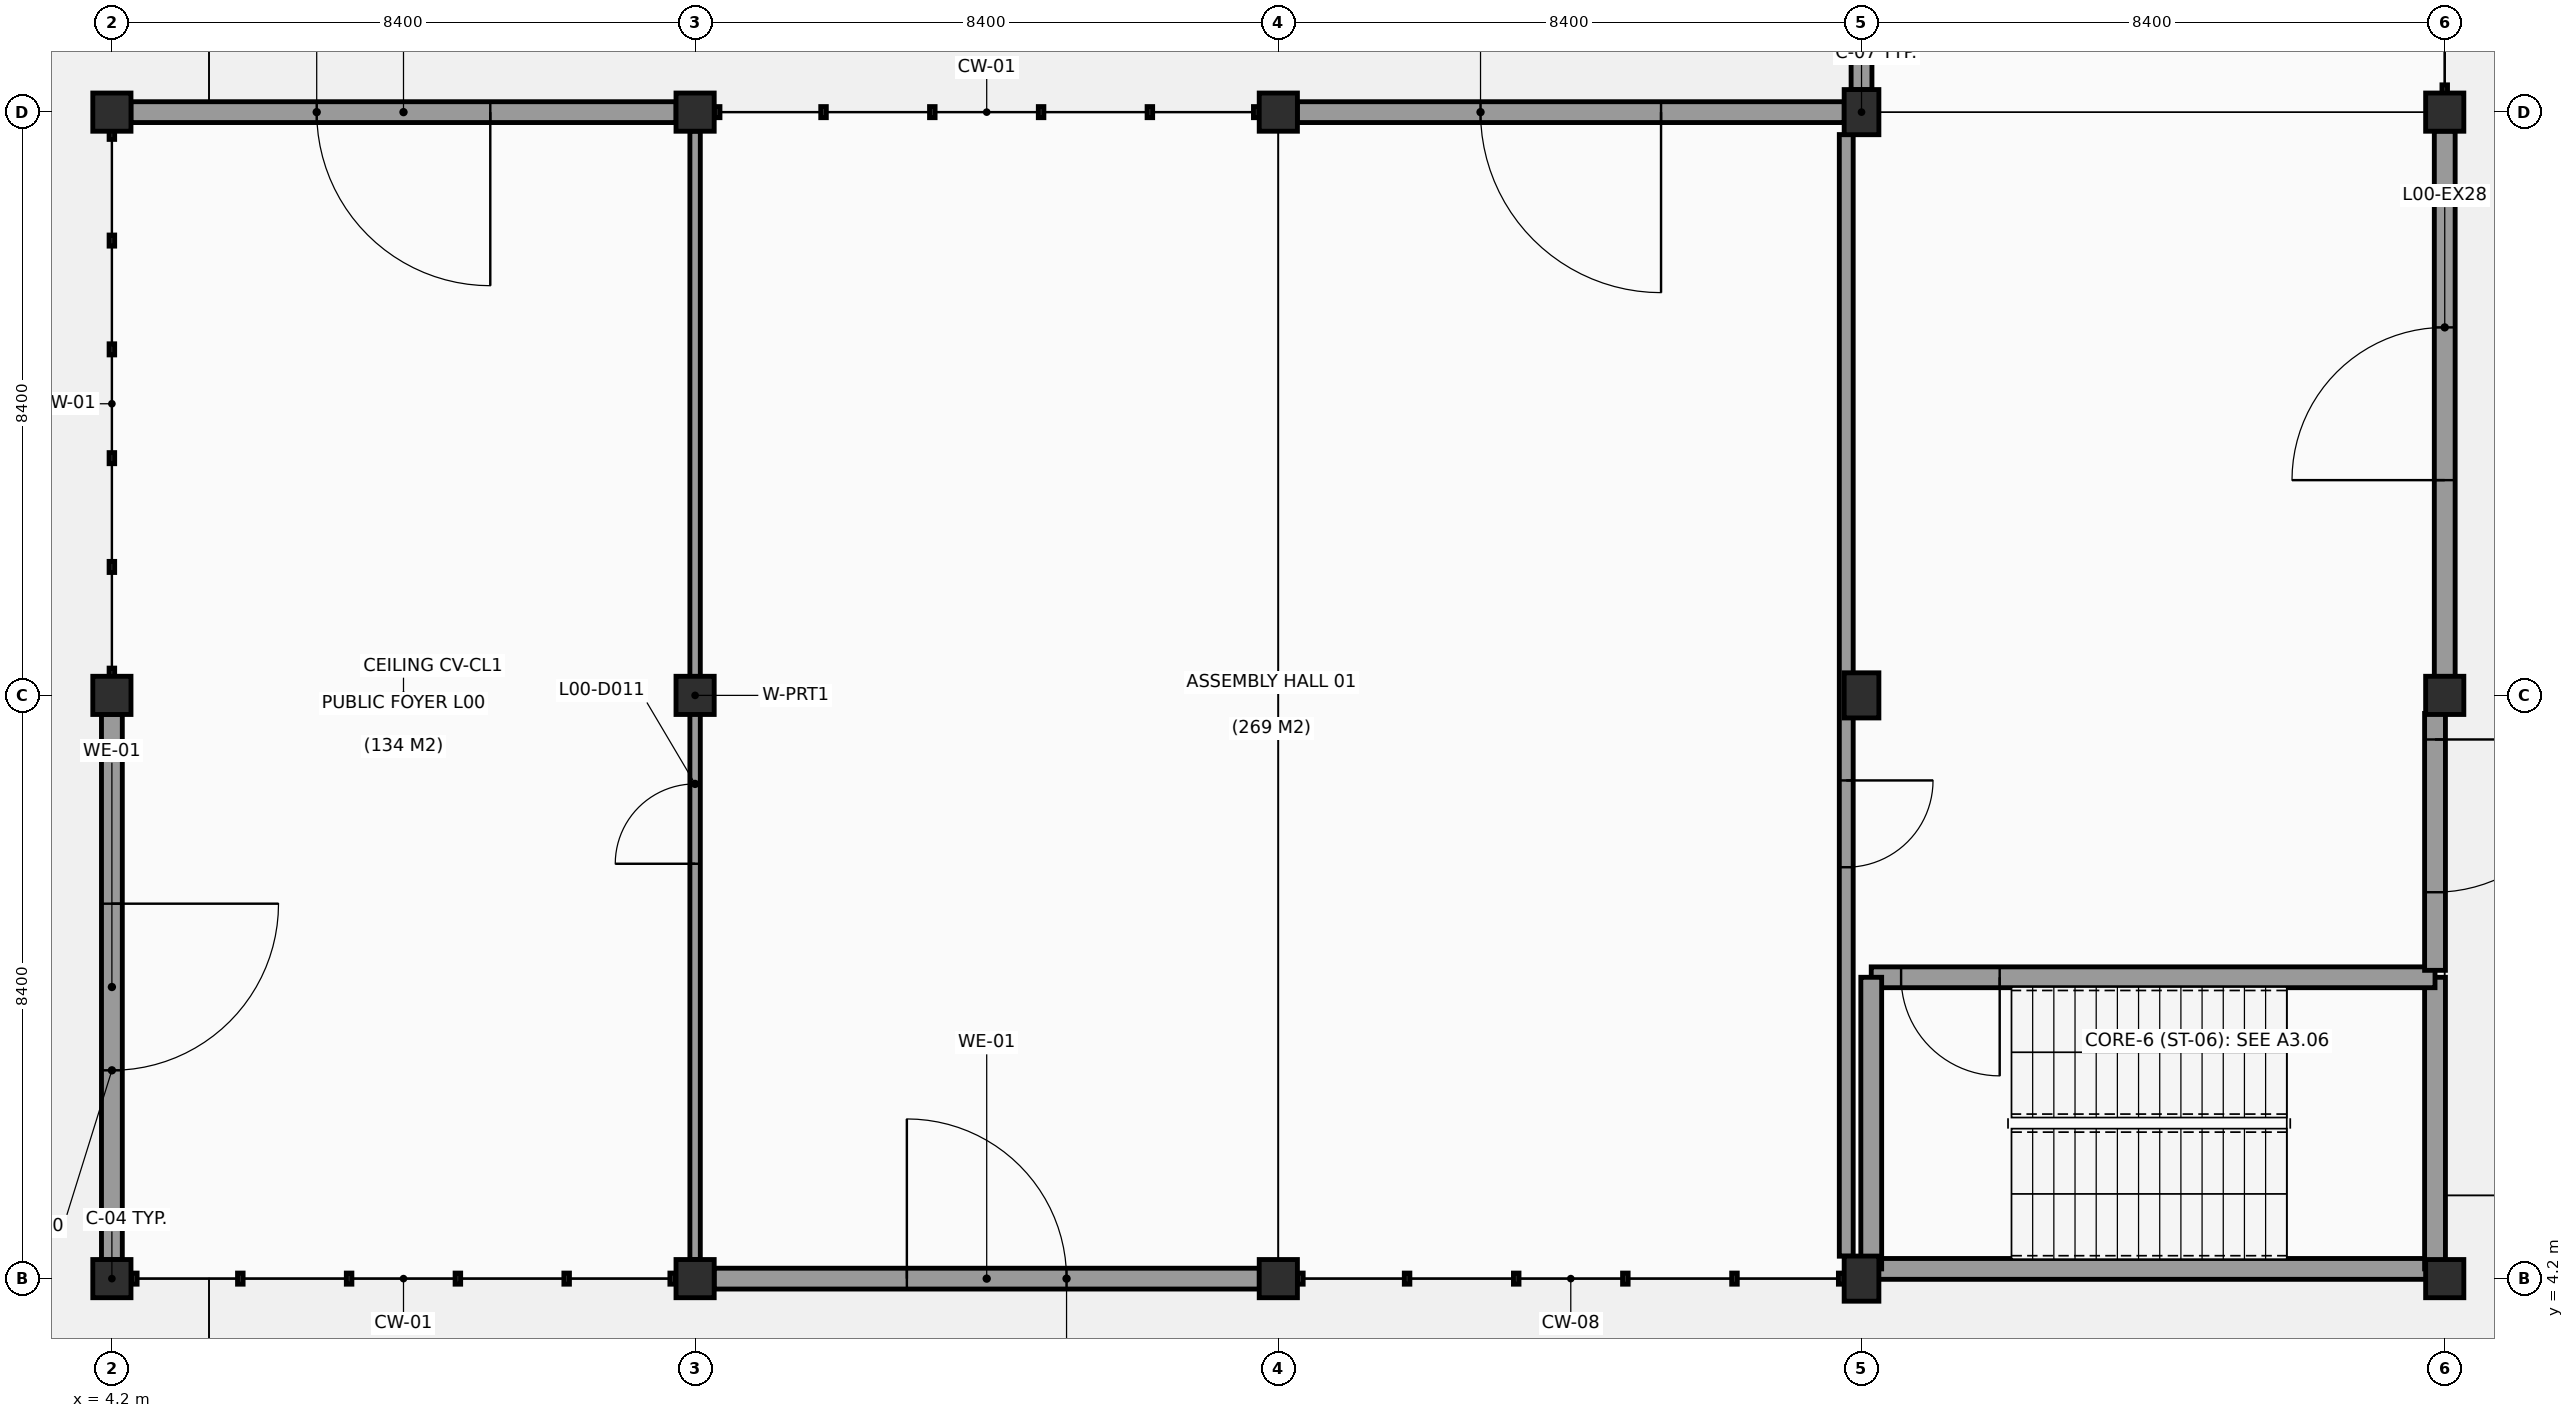
"""IFC4 building model, lengths in metres.
Left out: names, types, materials, properties, quantities, classifications, styles, units other than length and angle.
Written with IfcOpenShell. Run it as: python <this file> out.ifc"""

import sys

from ifc_helpers import new_model, si_unit, direction, frame, frame_2d, origin, origin_2d, place, context, subcontext, project, spatial, rectangle, extrude, element, fill, save


model = new_model("IFC4")
c1 = context("Model", 3, precision=1e-05, world=origin(), true_north=direction((0.0, 1.0)))
c2 = subcontext(c1, "Body", "Model", "MODEL_VIEW")
j1 = project(units=[si_unit("LENGTHUNIT", "METRE"), si_unit("PLANEANGLEUNIT", "RADIAN")], contexts=[c1])
p1 = place(None, origin())
s1 = spatial("IfcSite", under=j1, at=p1, CompositionType="ELEMENT")
p2 = place(p1, origin())
s2 = spatial("IfcBuilding", under=s1, at=p2, CompositionType="ELEMENT")
p3 = place(p2, origin())
s3 = spatial("IfcBuildingStorey", under=s2, at=p3, CompositionType="ELEMENT", Elevation=0.0)
for number, where, z_axis, x_axis in (
    (1, (4.2, 4.2, -0.4), (0.0, 0.0, 1.0), (1.0, 0.0, 0.0)),
    (2, (4.2, 12.6, -0.4), (0.0, 0.0, 1.0), (1.0, 0.0, 0.0)),
    (3, (4.2, 21.0, -0.4), (0.0, 0.0, 1.0), (1.0, 0.0, 0.0)),
    (4, (12.6, 4.2, -0.4), (0.0, 0.0, 1.0), (1.0, 0.0, 0.0)),
    (5, (12.6, 12.6, -0.4), (0.0, 0.0, 1.0), (1.0, 0.0, 0.0)),
    (6, (12.6, 21.0, -0.4), (0.0, 0.0, 1.0), (1.0, 0.0, 0.0)),
    (7, (21.0, 4.2, -0.4), (0.0, 0.0, 1.0), (1.0, 0.0, 0.0)),
    (8, (21.0, 21.0, -0.4), (0.0, 0.0, 1.0), (1.0, 0.0, 0.0)),
):
    element("IfcColumn", number, at=place(p3, frame(where, z_axis=z_axis, x_axis=x_axis)), inside=s3, PredefinedType="COLUMN", context=c2, shape_type="SweptSolid", body=[
        extrude(rectangle(XDim=0.55, YDim=0.55, at=origin_2d()), origin(), (0.0, 0.0, 1.0), 4.6),
    ])
for number, where, z_axis, x_axis in (
    (9, (29.4, 4.2, -0.4), (0.0, 0.0, 1.0), (1.0, 0.0, 0.0)),
    (10, (29.4, 12.6, -0.4), (0.0, 0.0, 1.0), (1.0, 0.0, 0.0)),
    (11, (29.4, 21.0, -0.4), (0.0, 0.0, 1.0), (1.0, 0.0, 0.0)),
):
    element("IfcColumn", number, at=place(p3, frame(where, z_axis=z_axis, x_axis=x_axis)), inside=s3, PredefinedType="COLUMN", context=c2, shape_type="SweptSolid", body=[
        extrude(rectangle(XDim=0.5, YDim=0.65, at=origin_2d()), origin(), (0.0, 0.0, 1.0), 4.6),
    ])
for number, where, z_axis, x_axis in (
    (12, (37.8, 4.2, -0.4), (0.0, 0.0, 1.0), (1.0, 0.0, 0.0)),
    (13, (37.8, 12.6, -0.4), (0.0, 0.0, 1.0), (1.0, 0.0, 0.0)),
    (14, (37.8, 21.0, -0.4), (0.0, 0.0, 1.0), (1.0, 0.0, 0.0)),
):
    element("IfcColumn", number, at=place(p3, frame(where, z_axis=z_axis, x_axis=x_axis)), inside=s3, PredefinedType="COLUMN", context=c2, shape_type="SweptSolid", body=[
        extrude(rectangle(XDim=0.55, YDim=0.55, at=origin_2d()), origin(), (0.0, 0.0, 1.0), 4.6),
    ])
p4 = place(p3, frame((29.4, 21.323, 0.0), z_axis=(0.0, 0.0, 1.0), x_axis=(0.0, 1.0, 0.0)))
e15 = element("IfcWall", 15, at=p4, inside=s3, PredefinedType="SOLIDWALL", context=c2, shape_type="SweptSolid", body=[
    extrude(rectangle(XDim=7.754, YDim=0.3, at=frame_2d((3.877, 0.0))), origin(), (0.0, 0.0, 1.0), 3.22),
])
p5 = place(p4, frame((2.827, 0.0, 0.0)))
e16 = element("IfcOpeningElement", 16, at=p5, cuts=e15, PredefinedType="OPENING", context=c2, shape_type="SweptSolid", body=[
    extrude(rectangle(XDim=2.1, YDim=2.3, at=frame_2d((1.05, 1.15))), frame((0.0, 0.16, 0.0), z_axis=(0.0, -1.0, 0.0), x_axis=(1.0, 0.0, 0.0)), (0.0, 0.0, 1.0), 0.32),
])
p6 = place(p3, frame((37.8, 20.727, 0.0), z_axis=(0.0, 0.0, 1.0), x_axis=(0.0, -1.0, 0.0)))
e17 = element("IfcWall", 17, at=p6, inside=s3, PredefinedType="SOLIDWALL", context=c2, shape_type="SweptSolid", body=[
    extrude(rectangle(XDim=7.854, YDim=0.3, at=frame_2d((3.927, 0.0))), origin(), (0.0, 0.0, 1.0), 3.22),
])
p7 = place(p6, frame((2.827, 0.0, 0.0)))
e18 = element("IfcOpeningElement", 18, at=p7, cuts=e17, PredefinedType="OPENING", context=c2, shape_type="SweptSolid", body=[
    extrude(rectangle(XDim=2.2, YDim=2.35, at=frame_2d((1.1, 1.175))), frame((0.0, 0.16, 0.0), z_axis=(0.0, -1.0, 0.0), x_axis=(1.0, 0.0, 0.0)), (0.0, 0.0, 1.0), 0.32),
])
p8 = place(p3, frame((20.727, 4.2, 0.0), z_axis=(0.0, 0.0, 1.0), x_axis=(-1.0, 0.0, 0.0)))
e19 = element("IfcWall", 19, at=p8, inside=s3, PredefinedType="SOLIDWALL", context=c2, shape_type="SweptSolid", body=[
    extrude(rectangle(XDim=7.854, YDim=0.3, at=frame_2d((3.927, 0.0))), origin(), (0.0, 0.0, 1.0), 3.22),
])
p9 = place(p8, frame((2.777, 0.0, 0.0)))
e20 = element("IfcOpeningElement", 20, at=p9, cuts=e19, PredefinedType="OPENING", context=c2, shape_type="SweptSolid", body=[
    extrude(rectangle(XDim=2.3, YDim=2.4, at=frame_2d((1.15, 1.2))), frame((0.0, 0.16, 0.0), z_axis=(0.0, -1.0, 0.0), x_axis=(1.0, 0.0, 0.0)), (0.0, 0.0, 1.0), 0.32),
])
p10 = place(p3, frame((4.2, 4.473, 0.0), z_axis=(0.0, 0.0, 1.0), x_axis=(0.0, 1.0, 0.0)))
e21 = element("IfcWall", 21, at=p10, inside=s3, PredefinedType="SOLIDWALL", context=c2, shape_type="SweptSolid", body=[
    extrude(rectangle(XDim=7.854, YDim=0.3, at=frame_2d((3.927, 0.0))), origin(), (0.0, 0.0, 1.0), 3.22),
])
p11 = place(p10, frame((2.727, 0.0, 0.0)))
e22 = element("IfcOpeningElement", 22, at=p11, cuts=e21, PredefinedType="OPENING", context=c2, shape_type="SweptSolid", body=[
    extrude(rectangle(XDim=2.4, YDim=2.45, at=frame_2d((1.2, 1.225))), frame((0.0, 0.16, 0.0), z_axis=(0.0, -1.0, 0.0), x_axis=(1.0, 0.0, 0.0)), (0.0, 0.0, 1.0), 0.32),
])
p12 = place(p3, frame((4.473, 21.0, 0.0), z_axis=(0.0, 0.0, 1.0), x_axis=(1.0, 0.0, 0.0)))
e23 = element("IfcWall", 23, at=p12, inside=s3, PredefinedType="SOLIDWALL", context=c2, shape_type="SweptSolid", body=[
    extrude(rectangle(XDim=7.854, YDim=0.3, at=frame_2d((3.927, 0.0))), origin(), (0.0, 0.0, 1.0), 3.22),
])
p13 = place(p12, frame((2.677, 0.0, 0.0)))
e24 = element("IfcOpeningElement", 24, at=p13, cuts=e23, PredefinedType="OPENING", context=c2, shape_type="SweptSolid", body=[
    extrude(rectangle(XDim=2.5, YDim=2.5, at=frame_2d((1.25, 1.25))), frame((0.0, 0.16, 0.0), z_axis=(0.0, -1.0, 0.0), x_axis=(1.0, 0.0, 0.0)), (0.0, 0.0, 1.0), 0.32),
])
p14 = place(p3, frame((21.273, 21.0, 0.0), z_axis=(0.0, 0.0, 1.0), x_axis=(1.0, 0.0, 0.0)))
e25 = element("IfcWall", 25, at=p14, inside=s3, PredefinedType="SOLIDWALL", context=c2, shape_type="SweptSolid", body=[
    extrude(rectangle(XDim=7.879, YDim=0.3, at=frame_2d((3.939, 0.0))), origin(), (0.0, 0.0, 1.0), 3.22),
])
p15 = place(p14, frame((2.639, 0.0, 0.0)))
e26 = element("IfcOpeningElement", 26, at=p15, cuts=e25, PredefinedType="OPENING", context=c2, shape_type="SweptSolid", body=[
    extrude(rectangle(XDim=2.6, YDim=2.55, at=frame_2d((1.3, 1.275))), frame((0.0, 0.16, 0.0), z_axis=(0.0, -1.0, 0.0), x_axis=(1.0, 0.0, 0.0)), (0.0, 0.0, 1.0), 0.32),
])
p16 = place(p3, frame((29.54, 4.34, -0.4), z_axis=(0.0, 0.0, 1.0), x_axis=(1.0, 0.0, 0.0)))
e27 = element("IfcWall", 27, at=p16, inside=s3, PredefinedType="SHEAR", context=c2, shape_type="SweptSolid", body=[
    extrude(rectangle(XDim=8.12, YDim=0.3, at=frame_2d((4.06, 0.0))), origin(), (0.0, 0.0, 1.0), 4.6),
])
p17 = place(p3, frame((37.66, 4.34, -0.4), z_axis=(0.0, 0.0, 1.0), x_axis=(0.0, 1.0, 0.0)))
e28 = element("IfcWall", 28, at=p17, inside=s3, PredefinedType="SHEAR", context=c2, shape_type="SweptSolid", body=[
    extrude(rectangle(XDim=4.2, YDim=0.3, at=frame_2d((2.1, 0.0))), origin(), (0.0, 0.0, 1.0), 4.6),
])
p18 = place(p3, frame((37.66, 8.54, -0.4), z_axis=(0.0, 0.0, 1.0), x_axis=(-1.0, 0.0, 0.0)))
e29 = element("IfcWall", 29, at=p18, inside=s3, PredefinedType="SHEAR", context=c2, shape_type="SweptSolid", body=[
    extrude(rectangle(XDim=8.12, YDim=0.3, at=frame_2d((4.06, 0.0))), origin(), (0.0, 0.0, 1.0), 4.6),
])
p19 = place(p18, frame((6.27, 0.0, 0.4)))
e30 = element("IfcOpeningElement", 30, at=p19, cuts=e29, PredefinedType="OPENING", context=c2, shape_type="SweptSolid", body=[
    extrude(rectangle(XDim=1.42, YDim=2.15, at=frame_2d((0.71, 1.075))), frame((0.0, 0.16, 0.0), z_axis=(0.0, -1.0, 0.0), x_axis=(1.0, 0.0, 0.0)), (0.0, 0.0, 1.0), 0.32),
])
p20 = place(p3, frame((29.54, 8.54, -0.4), z_axis=(0.0, 0.0, 1.0), x_axis=(0.0, -1.0, 0.0)))
e31 = element("IfcWall", 31, at=p20, inside=s3, PredefinedType="SHEAR", context=c2, shape_type="SweptSolid", body=[
    extrude(rectangle(XDim=4.2, YDim=0.3, at=frame_2d((2.1, 0.0))), origin(), (0.0, 0.0, 1.0), 4.6),
])
p21 = place(p3, frame((37.66, 8.64, -0.4), z_axis=(0.0, 0.0, 1.0), x_axis=(0.0, 1.0, 0.0)))
e32 = element("IfcWall", 32, at=p21, inside=s3, PredefinedType="SHEAR", context=c2, shape_type="SweptSolid", body=[
    extrude(rectangle(XDim=3.7, YDim=0.3, at=frame_2d((1.85, 0.0))), origin(), (0.0, 0.0, 1.0), 4.32),
])
p22 = place(p21, frame((1.125, 0.0, 0.4)))
e33 = element("IfcOpeningElement", 33, at=p22, cuts=e32, PredefinedType="OPENING", context=c2, shape_type="SweptSolid", body=[
    extrude(rectangle(XDim=2.2, YDim=2.35, at=frame_2d((1.1, 1.175))), frame((0.0, 0.16, 0.0), z_axis=(0.0, -1.0, 0.0), x_axis=(1.0, 0.0, 0.0)), (0.0, 0.0, 1.0), 0.32),
])
p23 = place(p3, frame((12.6, 20.727, 0.0), z_axis=(0.0, 0.0, 1.0), x_axis=(0.0, -1.0, 0.0)))
e34 = element("IfcWall", 34, at=p23, inside=s3, PredefinedType="PARTITIONING", context=c2, shape_type="SweptSolid", body=[
    extrude(rectangle(XDim=16.254, YDim=0.15, at=frame_2d((8.127, 0.0))), origin(), (0.0, 0.0, 1.0), 3.22),
])
p24 = place(p23, frame((9.402, 0.0, 0.0)))
e35 = element("IfcOpeningElement", 35, at=p24, cuts=e34, PredefinedType="OPENING", context=c2, shape_type="SweptSolid", body=[
    extrude(rectangle(XDim=1.15, YDim=2.15, at=frame_2d((0.575, 1.075))), frame((0.0, 0.085, 0.0), z_axis=(0.0, -1.0, 0.0), x_axis=(1.0, 0.0, 0.0)), (0.0, 0.0, 1.0), 0.17),
])
p25 = place(p3, frame((29.18, 20.677, 0.0), z_axis=(0.0, 0.0, 1.0), x_axis=(0.0, -1.0, 0.0)))
e36 = element("IfcWall", 36, at=p25, inside=s3, PredefinedType="PARTITIONING", context=c2, shape_type="SweptSolid", body=[
    extrude(rectangle(XDim=16.154, YDim=0.2, at=frame_2d((8.077, 0.0))), origin(), (0.0, 0.0, 1.0), 3.22),
])
p26 = place(p25, frame((9.302, 0.0, 0.0)))
e37 = element("IfcOpeningElement", 37, at=p26, cuts=e36, PredefinedType="OPENING", context=c2, shape_type="SweptSolid", body=[
    extrude(rectangle(XDim=1.25, YDim=2.15, at=frame_2d((0.625, 1.075))), frame((0.0, 0.11, 0.0), z_axis=(0.0, -1.0, 0.0), x_axis=(1.0, 0.0, 0.0)), (0.0, 0.0, 1.0), 0.22),
])
p27 = place(p7, origin())
e38 = element("IfcDoor", 38, at=p27, inside=s3, OperationType="DOUBLE_DOOR_SINGLE_SWING", PredefinedType="DOOR", context=c2, shape_type="SweptSolid", body=[
    extrude(rectangle(XDim=2.2, YDim=2.35, at=frame_2d((1.1, 1.175))), frame((0.0, 0.025, 0.0), z_axis=(0.0, -1.0, 0.0), x_axis=(1.0, 0.0, 0.0)), (0.0, 0.0, 1.0), 0.05),
])
fill(e18, e38)
p28 = place(p9, origin())
e39 = element("IfcDoor", 39, at=p28, inside=s3, OperationType="DOUBLE_DOOR_SINGLE_SWING", PredefinedType="DOOR", context=c2, shape_type="SweptSolid", body=[
    extrude(rectangle(XDim=2.3, YDim=2.4, at=frame_2d((1.15, 1.2))), frame((0.0, 0.025, 0.0), z_axis=(0.0, -1.0, 0.0), x_axis=(1.0, 0.0, 0.0)), (0.0, 0.0, 1.0), 0.05),
])
fill(e20, e39)
p29 = place(p11, origin())
e40 = element("IfcDoor", 40, at=p29, inside=s3, OperationType="DOUBLE_DOOR_SINGLE_SWING", PredefinedType="DOOR", context=c2, shape_type="SweptSolid", body=[
    extrude(rectangle(XDim=2.4, YDim=2.45, at=frame_2d((1.2, 1.225))), frame((0.0, 0.025, 0.0), z_axis=(0.0, -1.0, 0.0), x_axis=(1.0, 0.0, 0.0)), (0.0, 0.0, 1.0), 0.05),
])
fill(e22, e40)
p30 = place(p13, origin())
e41 = element("IfcDoor", 41, at=p30, inside=s3, OperationType="DOUBLE_DOOR_SINGLE_SWING", PredefinedType="DOOR", context=c2, shape_type="SweptSolid", body=[
    extrude(rectangle(XDim=2.5, YDim=2.5, at=frame_2d((1.25, 1.25))), frame((0.0, 0.025, 0.0), z_axis=(0.0, -1.0, 0.0), x_axis=(1.0, 0.0, 0.0)), (0.0, 0.0, 1.0), 0.05),
])
fill(e24, e41)
p31 = place(p15, origin())
e42 = element("IfcDoor", 42, at=p31, inside=s3, OperationType="DOUBLE_DOOR_SINGLE_SWING", PredefinedType="DOOR", context=c2, shape_type="SweptSolid", body=[
    extrude(rectangle(XDim=2.6, YDim=2.55, at=frame_2d((1.3, 1.275))), frame((0.0, 0.025, 0.0), z_axis=(0.0, -1.0, 0.0), x_axis=(1.0, 0.0, 0.0)), (0.0, 0.0, 1.0), 0.05),
])
fill(e26, e42)
p32 = place(p19, origin())
e43 = element("IfcDoor", 43, at=p32, inside=s3, OperationType="SINGLE_SWING_LEFT", PredefinedType="DOOR", context=c2, shape_type="SweptSolid", body=[
    extrude(rectangle(XDim=1.42, YDim=2.15, at=frame_2d((0.71, 1.075))), frame((0.0, 0.025, 0.0), z_axis=(0.0, -1.0, 0.0), x_axis=(1.0, 0.0, 0.0)), (0.0, 0.0, 1.0), 0.05),
])
fill(e30, e43)
p33 = place(p22, origin())
e44 = element("IfcDoor", 44, at=p33, inside=s3, OperationType="SINGLE_SWING_RIGHT", PredefinedType="DOOR", context=c2, shape_type="SweptSolid", body=[
    extrude(rectangle(XDim=2.2, YDim=2.35, at=frame_2d((1.1, 1.175))), frame((0.0, 0.025, 0.0), z_axis=(0.0, -1.0, 0.0), x_axis=(1.0, 0.0, 0.0)), (0.0, 0.0, 1.0), 0.05),
])
fill(e33, e44)
p34 = place(p24, origin())
e45 = element("IfcDoor", 45, at=p34, inside=s3, OperationType="SINGLE_SWING_RIGHT", PredefinedType="DOOR", context=c2, shape_type="SweptSolid", body=[
    extrude(rectangle(XDim=1.15, YDim=2.15, at=frame_2d((0.575, 1.075))), frame((0.0, 0.025, 0.0), z_axis=(0.0, -1.0, 0.0), x_axis=(1.0, 0.0, 0.0)), (0.0, 0.0, 1.0), 0.05),
])
fill(e35, e45)
p35 = place(p26, origin())
e46 = element("IfcDoor", 46, at=p35, inside=s3, OperationType="SINGLE_SWING_LEFT", PredefinedType="DOOR", context=c2, shape_type="SweptSolid", body=[
    extrude(rectangle(XDim=1.25, YDim=2.15, at=frame_2d((0.625, 1.075))), frame((0.0, 0.025, 0.0), z_axis=(0.0, -1.0, 0.0), x_axis=(1.0, 0.0, 0.0)), (0.0, 0.0, 1.0), 0.05),
])
fill(e37, e46)
save(model, sys.argv[1])
